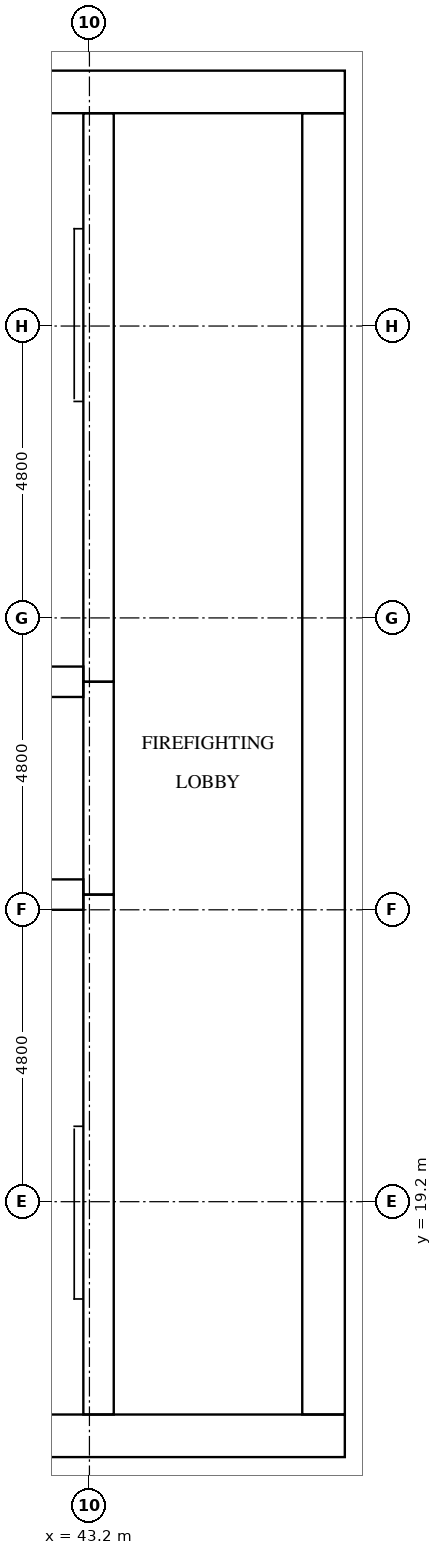
"""IFC4 building model, lengths in metres.
Left out: names, types, materials, properties, quantities, classifications, styles, units other than length and angle.
Written with IfcOpenShell. Run it as: python <this file> out.ifc"""

import sys

from ifc_helpers import new_model, si_unit, direction, frame, frame_2d, origin, place, context, subcontext, project, spatial, rectangle, extrude, element, fill, save


model = new_model("IFC4")
c1 = context("Model", 3, precision=1e-05, world=origin(), true_north=direction((0.0, 1.0)))
c2 = subcontext(c1, "Body", "Model", "MODEL_VIEW")
j1 = project(units=[si_unit("LENGTHUNIT", "METRE"), si_unit("PLANEANGLEUNIT", "RADIAN")], contexts=[c1])
p1 = place(None, origin())
s1 = spatial("IfcSite", under=j1, at=p1, CompositionType="ELEMENT")
p2 = place(p1, origin())
s2 = spatial("IfcBuilding", under=s1, at=p2, CompositionType="ELEMENT")
p3 = place(p2, frame((0.0, 0.0, 212.3)))
s3 = spatial("IfcBuildingStorey", under=s2, at=p3, CompositionType="ELEMENT", Elevation=212.3)
p4 = place(p3, frame((15.0, 15.35, 0.0), z_axis=(0.0, 0.0, 1.0), x_axis=(1.0, 0.0, 0.0)))
e1 = element("IfcWall", 1, at=p4, inside=s3, PredefinedType="SHEAR", context=c2, shape_type="SweptSolid", body=[
    extrude(rectangle(XDim=32.4, YDim=0.7, at=frame_2d((16.2, 0.0))), origin(), (0.0, 0.0, 1.0), 3.2),
])
p5 = place(p4, frame((15.3, 0.0, 0.0)))
e2 = element("IfcOpeningElement", 2, at=p5, cuts=e1, PredefinedType="OPENING", context=c2, shape_type="SweptSolid", body=[
    extrude(rectangle(XDim=1.8, YDim=2.1, at=frame_2d((0.9, 1.05))), frame((0.0, 0.36, 0.0), z_axis=(0.0, -1.0, 0.0), x_axis=(1.0, 0.0, 0.0)), (0.0, 0.0, 1.0), 0.72),
])
p6 = place(p3, frame((15.0, 37.45, 0.0), z_axis=(0.0, 0.0, 1.0), x_axis=(1.0, 0.0, 0.0)))
e3 = element("IfcWall", 3, at=p6, inside=s3, PredefinedType="SHEAR", context=c2, shape_type="SweptSolid", body=[
    extrude(rectangle(XDim=32.4, YDim=0.7, at=frame_2d((16.2, 0.0))), origin(), (0.0, 0.0, 1.0), 3.2),
])
p7 = place(p6, frame((15.3, 0.0, 0.0)))
e4 = element("IfcOpeningElement", 4, at=p7, cuts=e3, PredefinedType="OPENING", context=c2, shape_type="SweptSolid", body=[
    extrude(rectangle(XDim=1.8, YDim=2.1, at=frame_2d((0.9, 1.05))), frame((0.0, 0.36, 0.0), z_axis=(0.0, -1.0, 0.0), x_axis=(1.0, 0.0, 0.0)), (0.0, 0.0, 1.0), 0.72),
])
p8 = place(p6, frame((1.544, 0.0, 0.0)))
e5 = element("IfcOpeningElement", 5, at=p8, cuts=e3, PredefinedType="OPENING", context=c2, shape_type="SweptSolid", body=[
    extrude(rectangle(XDim=1.0, YDim=2.1, at=frame_2d((0.5, 1.05))), frame((0.0, 0.36, 0.0), z_axis=(0.0, -1.0, 0.0), x_axis=(1.0, 0.0, 0.0)), (0.0, 0.0, 1.0), 0.72),
])
p9 = place(p6, frame((5.219, 0.0, 0.0)))
e6 = element("IfcOpeningElement", 6, at=p9, cuts=e3, PredefinedType="OPENING", context=c2, shape_type="SweptSolid", body=[
    extrude(rectangle(XDim=1.0, YDim=2.1, at=frame_2d((0.5, 1.05))), frame((0.0, 0.36, 0.0), z_axis=(0.0, -1.0, 0.0), x_axis=(1.0, 0.0, 0.0)), (0.0, 0.0, 1.0), 0.72),
])
p10 = place(p3, frame((47.05, 15.7, 0.0), z_axis=(0.0, 0.0, 1.0), x_axis=(0.0, 1.0, 0.0)))
e7 = element("IfcWall", 7, at=p10, inside=s3, PredefinedType="SHEAR", context=c2, shape_type="SweptSolid", body=[
    extrude(rectangle(XDim=21.4, YDim=0.7, at=frame_2d((10.7, 0.0))), origin(), (0.0, 0.0, 1.0), 3.2),
])
p11 = place(p10, frame((10.4, 0.0, 0.0)))
e8 = element("IfcOpeningElement", 8, at=p11, cuts=e7, PredefinedType="OPENING", context=c2, shape_type="SweptSolid", body=[
    extrude(rectangle(XDim=1.2, YDim=2.1, at=frame_2d((0.6, 1.05))), frame((0.0, 0.36, 0.0), z_axis=(0.0, -1.0, 0.0), x_axis=(1.0, 0.0, 0.0)), (0.0, 0.0, 1.0), 0.72),
])
p12 = place(p3, frame((43.35, 15.7, 0.0), z_axis=(0.0, 0.0, 1.0), x_axis=(0.0, 1.0, 0.0)))
e9 = element("IfcWall", 9, at=p12, inside=s3, PredefinedType="SHEAR", context=c2, shape_type="SweptSolid", body=[
    extrude(rectangle(XDim=8.55, YDim=0.5, at=frame_2d((4.275, 0.0))), origin(), (0.0, 0.0, 1.0), 3.2),
])
p13 = place(p12, frame((0.5, 0.0, 0.0)))
e10 = element("IfcOpeningElement", 10, at=p13, cuts=e9, PredefinedType="OPENING", context=c2, shape_type="SweptSolid", body=[
    extrude(rectangle(XDim=1.2, YDim=2.1, at=frame_2d((0.6, 1.05))), frame((0.0, 0.26, 0.0), z_axis=(0.0, -1.0, 0.0), x_axis=(1.0, 0.0, 0.0)), (0.0, 0.0, 1.0), 0.52),
])
p14 = place(p3, frame((43.35, 24.25, 0.0), z_axis=(0.0, 0.0, 1.0), x_axis=(0.0, 1.0, 0.0)))
e11 = element("IfcWall", 11, at=p14, inside=s3, PredefinedType="SHEAR", context=c2, shape_type="SweptSolid", body=[
    extrude(rectangle(XDim=3.5, YDim=0.5, at=frame_2d((1.75, 0.0))), origin(), (0.0, 0.0, 1.0), 3.2),
])
p15 = place(p14, frame((1.2, 0.0, 0.0)))
e12 = element("IfcOpeningElement", 12, at=p15, cuts=e11, PredefinedType="OPENING", context=c2, shape_type="SweptSolid", body=[
    extrude(rectangle(XDim=1.1, YDim=2.1, at=frame_2d((0.55, 1.05))), frame((0.0, 0.26, 0.0), z_axis=(0.0, -1.0, 0.0), x_axis=(1.0, 0.0, 0.0)), (0.0, 0.0, 1.0), 0.52),
])
p16 = place(p3, frame((43.35, 27.75, 0.0), z_axis=(0.0, 0.0, 1.0), x_axis=(0.0, 1.0, 0.0)))
e13 = element("IfcWall", 13, at=p16, inside=s3, PredefinedType="SHEAR", context=c2, shape_type="SweptSolid", body=[
    extrude(rectangle(XDim=9.35, YDim=0.5, at=frame_2d((4.675, 0.0))), origin(), (0.0, 0.0, 1.0), 3.2),
])
p17 = place(p16, frame((7.65, 0.0, 0.0)))
e14 = element("IfcOpeningElement", 14, at=p17, cuts=e13, PredefinedType="OPENING", context=c2, shape_type="SweptSolid", body=[
    extrude(rectangle(XDim=1.2, YDim=2.1, at=frame_2d((0.6, 1.05))), frame((0.0, 0.26, 0.0), z_axis=(0.0, -1.0, 0.0), x_axis=(1.0, 0.0, 0.0)), (0.0, 0.0, 1.0), 0.52),
])
for number, where, z_axis, x_axis in (
    (15, (39.55, 24.25, 0.0), (0.0, 0.0, 1.0), (1.0, 0.0, 0.0)),
    (16, (39.55, 27.75, 0.0), (0.0, 0.0, 1.0), (1.0, 0.0, 0.0)),
):
    element("IfcWall", number, at=place(p3, frame(where, z_axis=z_axis, x_axis=x_axis)), inside=s3, PredefinedType="SHEAR", context=c2, shape_type="SweptSolid", body=[
        extrude(rectangle(XDim=3.55, YDim=0.5, at=frame_2d((1.775, 0.0))), origin(), (0.0, 0.0, 1.0), 3.2),
    ])
p18 = place(p15, origin())
e17 = element("IfcDoor", 17, at=p18, inside=s3, OperationType="DOUBLE_DOOR_SLIDING", PredefinedType="DOOR", context=c2, shape_type="SweptSolid", body=[
    extrude(rectangle(XDim=1.1, YDim=2.1, at=frame_2d((0.55, 1.05))), frame((0.0, 0.025, 0.0), z_axis=(0.0, -1.0, 0.0), x_axis=(1.0, 0.0, 0.0)), (0.0, 0.0, 1.0), 0.05),
])
fill(e12, e17)
p19 = place(p13, origin())
e18 = element("IfcDoor", 18, at=p19, inside=s3, OperationType="SINGLE_SWING_RIGHT", PredefinedType="DOOR", context=c2, shape_type="SweptSolid", body=[
    extrude(rectangle(XDim=1.2, YDim=2.1, at=frame_2d((0.6, 1.05))), frame((0.0, 0.025, 0.0), z_axis=(0.0, -1.0, 0.0), x_axis=(1.0, 0.0, 0.0)), (0.0, 0.0, 1.0), 0.05),
])
fill(e10, e18)
p20 = place(p17, origin())
e19 = element("IfcDoor", 19, at=p20, inside=s3, OperationType="SINGLE_SWING_LEFT", PredefinedType="DOOR", context=c2, shape_type="SweptSolid", body=[
    extrude(rectangle(XDim=1.2, YDim=2.1, at=frame_2d((0.6, 1.05))), frame((0.0, 0.025, 0.0), z_axis=(0.0, -1.0, 0.0), x_axis=(1.0, 0.0, 0.0)), (0.0, 0.0, 1.0), 0.05),
])
fill(e14, e19)
p21 = place(p11, origin())
e20 = element("IfcDoor", 20, at=p21, inside=s3, OperationType="SINGLE_SWING_LEFT", PredefinedType="DOOR", context=c2, shape_type="SweptSolid", body=[
    extrude(rectangle(XDim=1.2, YDim=2.1, at=frame_2d((0.6, 1.05))), frame((0.0, 0.025, 0.0), z_axis=(0.0, -1.0, 0.0), x_axis=(1.0, 0.0, 0.0)), (0.0, 0.0, 1.0), 0.05),
])
fill(e8, e20)
save(model, sys.argv[1])
